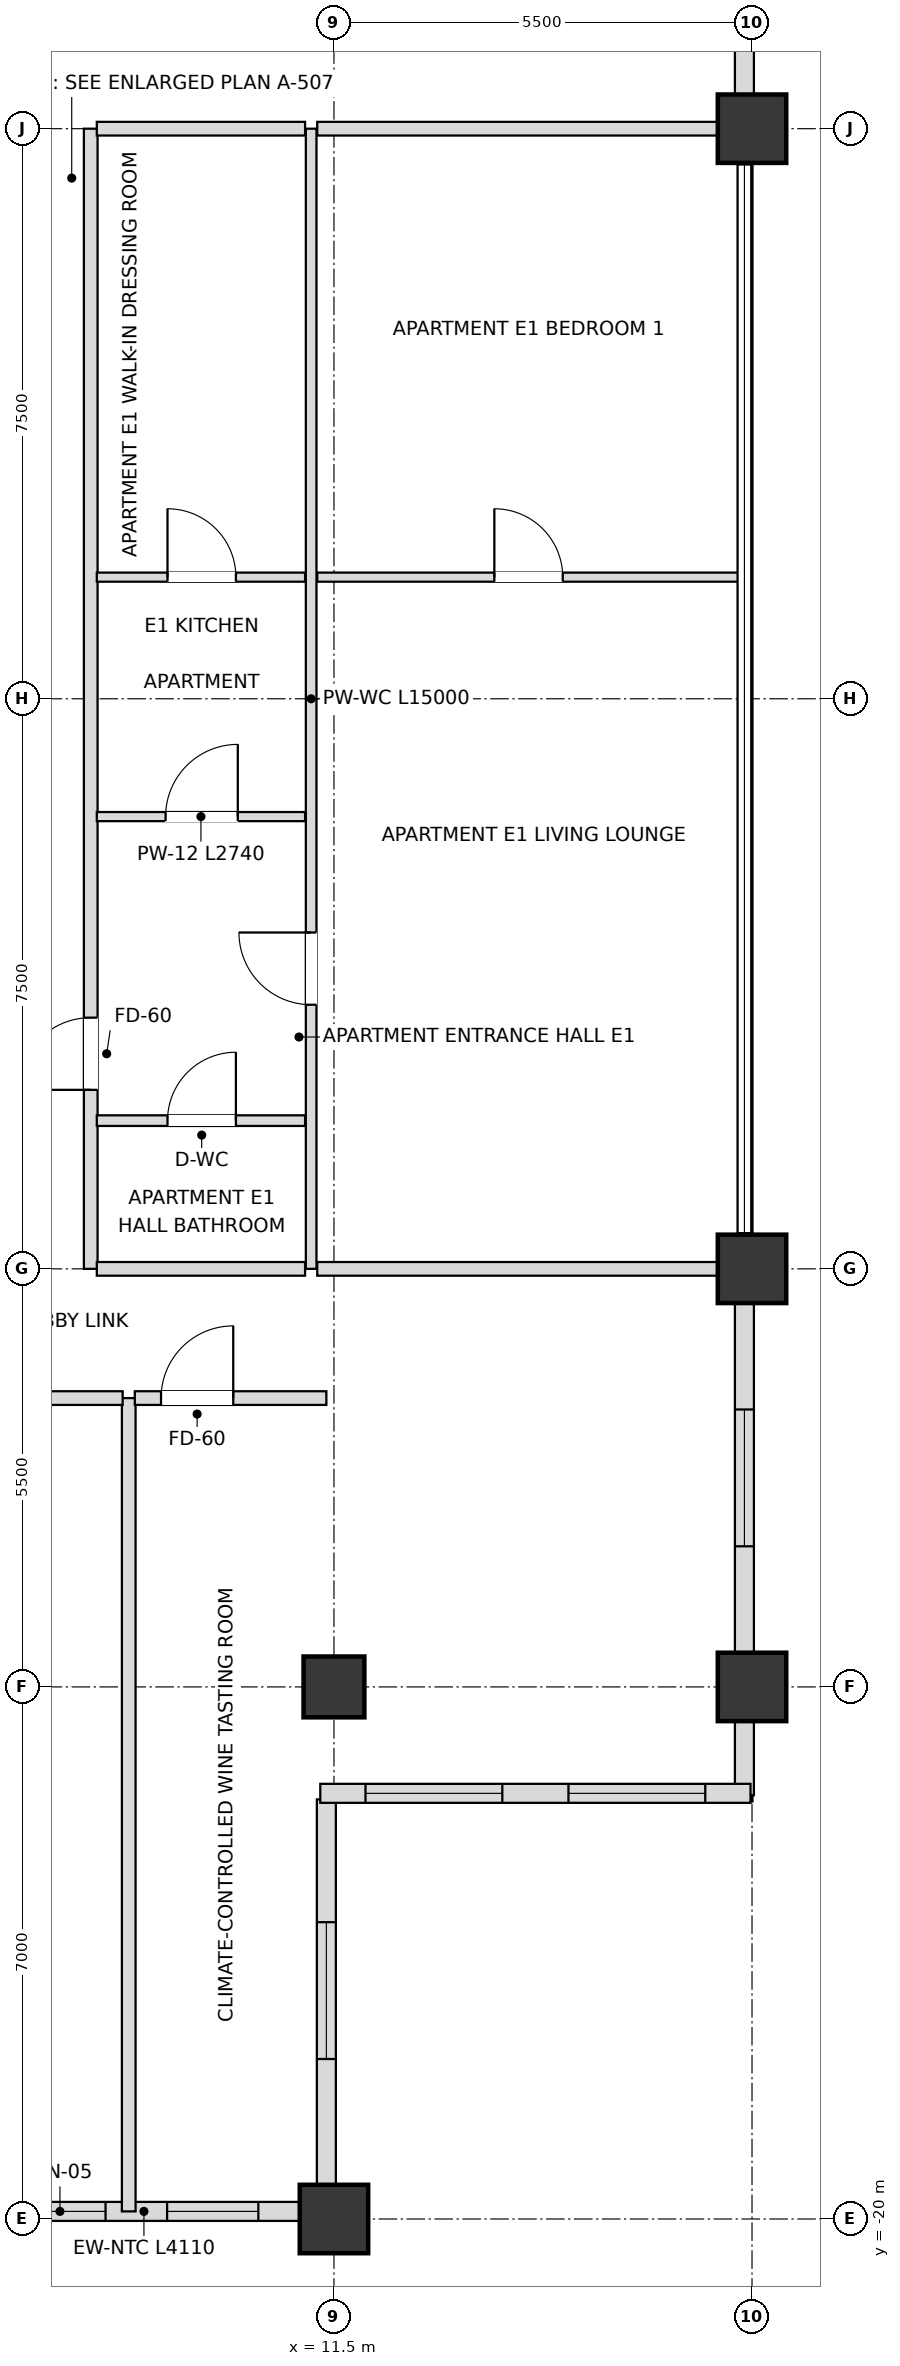
"""IFC4 building model, lengths in metres.
Left out: names, types, materials, properties, quantities, classifications, styles, units other than length and angle.
Written with IfcOpenShell. Run it as: python <this file> out.ifc"""

import sys

from ifc_helpers import new_model, si_unit, direction, frame, frame_2d, origin, origin_2d, place, context, subcontext, project, spatial, rectangle, extrude, element, fill, save


model = new_model("IFC4")
c1 = context("Model", 3, precision=1e-05, world=origin(), true_north=direction((0.0, 1.0)))
c2 = subcontext(c1, "Body", "Model", "MODEL_VIEW")
j1 = project(units=[si_unit("LENGTHUNIT", "METRE"), si_unit("PLANEANGLEUNIT", "RADIAN")], contexts=[c1])
p1 = place(None, origin())
s1 = spatial("IfcSite", under=j1, at=p1, CompositionType="ELEMENT")
p2 = place(p1, origin())
s2 = spatial("IfcBuilding", under=s1, at=p2, CompositionType="ELEMENT")
p3 = place(p2, frame((0.0, 0.0, 290.7)))
s3 = spatial("IfcBuildingStorey", under=s2, at=p3, CompositionType="ELEMENT", Elevation=290.7)
for number, where, z_axis, x_axis in (
    (1, (11.5, -20.0, 0.0), (0.0, 0.0, 1.0), (1.0, 0.0, 0.0)),
    (2, (17.0, -13.0, 0.0), (0.0, 0.0, 1.0), (1.0, 0.0, 0.0)),
    (3, (17.0, -7.5, 0.0), (0.0, 0.0, 1.0), (1.0, 0.0, 0.0)),
    (4, (17.0, 7.5, 0.0), (0.0, 0.0, 1.0), (1.0, 0.0, 0.0)),
):
    element("IfcColumn", number, at=place(p3, frame(where, z_axis=z_axis, x_axis=x_axis)), inside=s3, PredefinedType="USERDEFINED", context=c2, shape_type="SweptSolid", body=[
        extrude(rectangle(XDim=0.9, YDim=0.9, at=origin_2d()), origin(), (0.0, 0.0, 1.0), 3.6),
    ])
p4 = place(p3, frame((11.5, -13.0, 0.0), z_axis=(0.0, 0.0, 1.0), x_axis=(1.0, 0.0, 0.0)))
e5 = element("IfcColumn", 5, at=p4, inside=s3, PredefinedType="COLUMN", context=c2, shape_type="SweptSolid", body=[
    extrude(rectangle(XDim=0.8, YDim=0.8, at=origin_2d()), origin(), (0.0, 0.0, 1.0), 3.6),
])
p5 = place(p3, frame((6.945, -19.9, 0.0), z_axis=(0.0, 0.0, 1.0), x_axis=(1.0, 0.0, 0.0)))
e6 = element("IfcWall", 6, at=p5, inside=s3, PredefinedType="SOLIDWALL", context=c2, shape_type="SweptSolid", body=[
    extrude(rectangle(XDim=4.11, YDim=0.25, at=frame_2d((2.055, 0.0))), origin(), (0.0, 0.0, 1.0), 2.748),
])
p6 = place(p5, frame((0.35, 0.0, 0.72)))
e7 = element("IfcOpeningElement", 7, at=p6, cuts=e6, PredefinedType="OPENING", context=c2, shape_type="SweptSolid", body=[
    extrude(rectangle(XDim=1.2, YDim=1.68, at=frame_2d((0.6, 0.84))), frame((0.0, 0.135, 0.0), z_axis=(0.0, -1.0, 0.0), x_axis=(1.0, 0.0, 0.0)), (0.0, 0.0, 1.0), 0.27),
])
p7 = place(p5, frame((2.36, 0.0, 0.72)))
e8 = element("IfcOpeningElement", 8, at=p7, cuts=e6, PredefinedType="OPENING", context=c2, shape_type="SweptSolid", body=[
    extrude(rectangle(XDim=1.2, YDim=1.68, at=frame_2d((0.6, 0.84))), frame((0.0, 0.135, 0.0), z_axis=(0.0, -1.0, 0.0), x_axis=(1.0, 0.0, 0.0)), (0.0, 0.0, 1.0), 0.27),
])
p8 = place(p3, frame((16.9, -14.425, 0.0), z_axis=(0.0, 0.0, 1.0), x_axis=(0.0, 1.0, 0.0)))
e9 = element("IfcWall", 9, at=p8, inside=s3, PredefinedType="SOLIDWALL", context=c2, shape_type="SweptSolid", body=[
    extrude(rectangle(XDim=0.98, YDim=0.25, at=frame_2d((0.49, 0.0))), origin(), (0.0, 0.0, 1.0), 2.748),
])
p9 = place(p3, frame((16.9, -12.555, 0.0), z_axis=(0.0, 0.0, 1.0), x_axis=(0.0, 1.0, 0.0)))
e10 = element("IfcWall", 10, at=p9, inside=s3, PredefinedType="SOLIDWALL", context=c2, shape_type="SweptSolid", body=[
    extrude(rectangle(XDim=4.61, YDim=0.25, at=frame_2d((2.305, 0.0))), origin(), (0.0, 0.0, 1.0), 2.748),
])
p10 = place(p9, frame((1.405, 0.0, 0.72)))
e11 = element("IfcOpeningElement", 11, at=p10, cuts=e10, PredefinedType="OPENING", context=c2, shape_type="SweptSolid", body=[
    extrude(rectangle(XDim=1.8, YDim=1.68, at=frame_2d((0.9, 0.84))), frame((0.0, 0.135, 0.0), z_axis=(0.0, -1.0, 0.0), x_axis=(1.0, 0.0, 0.0)), (0.0, 0.0, 1.0), 0.27),
])
p11 = place(p3, frame((16.9, 7.945, 0.0), z_axis=(0.0, 0.0, 1.0), x_axis=(0.0, 1.0, 0.0)))
e12 = element("IfcWall", 12, at=p11, inside=s3, PredefinedType="SOLIDWALL", context=c2, shape_type="SweptSolid", body=[
    extrude(rectangle(XDim=4.61, YDim=0.25, at=frame_2d((2.305, 0.0))), origin(), (0.0, 0.0, 1.0), 2.748),
])
p12 = place(p11, frame((1.405, 0.0, 0.72)))
e13 = element("IfcOpeningElement", 13, at=p12, cuts=e12, PredefinedType="OPENING", context=c2, shape_type="SweptSolid", body=[
    extrude(rectangle(XDim=1.8, YDim=1.68, at=frame_2d((0.9, 0.84))), frame((0.0, 0.135, 0.0), z_axis=(0.0, -1.0, 0.0), x_axis=(1.0, 0.0, 0.0)), (0.0, 0.0, 1.0), 0.27),
])
p13 = place(p3, frame((11.4, -19.82, 0.0), z_axis=(0.0, 0.0, 1.0), x_axis=(0.0, 1.0, 0.0)))
e14 = element("IfcWall", 14, at=p13, inside=s3, PredefinedType="SOLIDWALL", context=c2, shape_type="SweptSolid", body=[
    extrude(rectangle(XDim=5.34, YDim=0.25, at=frame_2d((2.67, 0.0))), origin(), (0.0, 0.0, 1.0), 2.748),
])
p14 = place(p13, frame((1.925, 0.0, 0.72)))
e15 = element("IfcOpeningElement", 15, at=p14, cuts=e14, PredefinedType="OPENING", context=c2, shape_type="SweptSolid", body=[
    extrude(rectangle(XDim=1.8, YDim=1.68, at=frame_2d((0.9, 0.84))), frame((0.0, 0.135, 0.0), z_axis=(0.0, -1.0, 0.0), x_axis=(1.0, 0.0, 0.0)), (0.0, 0.0, 1.0), 0.27),
])
p15 = place(p3, frame((11.32, -14.4, 0.0), z_axis=(0.0, 0.0, 1.0), x_axis=(1.0, 0.0, 0.0)))
e16 = element("IfcWall", 16, at=p15, inside=s3, PredefinedType="SOLIDWALL", context=c2, shape_type="SweptSolid", body=[
    extrude(rectangle(XDim=5.66, YDim=0.25, at=frame_2d((2.83, 0.0))), origin(), (0.0, 0.0, 1.0), 2.748),
])
p16 = place(p15, frame((0.595, 0.0, 0.72)))
e17 = element("IfcOpeningElement", 17, at=p16, cuts=e16, PredefinedType="OPENING", context=c2, shape_type="SweptSolid", body=[
    extrude(rectangle(XDim=1.8, YDim=1.68, at=frame_2d((0.9, 0.84))), frame((0.0, 0.135, 0.0), z_axis=(0.0, -1.0, 0.0), x_axis=(1.0, 0.0, 0.0)), (0.0, 0.0, 1.0), 0.27),
])
p17 = place(p15, frame((3.265, 0.0, 0.72)))
e18 = element("IfcOpeningElement", 18, at=p17, cuts=e16, PredefinedType="OPENING", context=c2, shape_type="SweptSolid", body=[
    extrude(rectangle(XDim=1.8, YDim=1.68, at=frame_2d((0.9, 0.84))), frame((0.0, 0.135, 0.0), z_axis=(0.0, -1.0, 0.0), x_axis=(1.0, 0.0, 0.0)), (0.0, 0.0, 1.0), 0.27),
])
p18 = place(p3, frame((8.3, -7.5, 0.0), z_axis=(0.0, 0.0, 1.0), x_axis=(0.0, 1.0, 0.0)))
e19 = element("IfcWall", 19, at=p18, inside=s3, PredefinedType="PARTITIONING", context=c2, shape_type="SweptSolid", body=[
    extrude(rectangle(XDim=15.0, YDim=0.18, at=frame_2d((7.5, 0.0))), origin(), (0.0, 0.0, 1.0), 3.38),
])
p19 = place(p18, frame((2.355, 0.0, 0.0)))
e20 = element("IfcOpeningElement", 20, at=p19, cuts=e19, PredefinedType="OPENING", context=c2, shape_type="SweptSolid", body=[
    extrude(rectangle(XDim=0.95, YDim=2.15, at=frame_2d((0.475, 1.075))), frame((0.0, 0.1, 0.0), z_axis=(0.0, -1.0, 0.0), x_axis=(1.0, 0.0, 0.0)), (0.0, 0.0, 1.0), 0.2),
])
p20 = place(p3, frame((8.8, -19.9, 0.0), z_axis=(0.0, 0.0, 1.0), x_axis=(0.0, 1.0, 0.0)))
e21 = element("IfcWall", 21, at=p20, inside=s3, PredefinedType="PARTITIONING", context=c2, shape_type="SweptSolid", body=[
    extrude(rectangle(XDim=10.7, YDim=0.18, at=frame_2d((5.35, 0.0))), origin(), (0.0, 0.0, 1.0), 2.826),
])
p21 = place(p3, frame((11.2, -7.5, 0.0), z_axis=(0.0, 0.0, 1.0), x_axis=(0.0, 1.0, 0.0)))
e22 = element("IfcWall", 22, at=p21, inside=s3, PredefinedType="PARTITIONING", context=c2, shape_type="SweptSolid", body=[
    extrude(rectangle(XDim=15.0, YDim=0.14, at=frame_2d((7.5, 0.0))), origin(), (0.0, 0.0, 1.0), 3.38),
])
p22 = place(p21, frame((3.475, 0.0, 0.0)))
e23 = element("IfcOpeningElement", 23, at=p22, cuts=e22, PredefinedType="OPENING", context=c2, shape_type="SweptSolid", body=[
    extrude(rectangle(XDim=0.95, YDim=2.1, at=frame_2d((0.475, 1.05))), frame((0.0, 0.08, 0.0), z_axis=(0.0, -1.0, 0.0), x_axis=(1.0, 0.0, 0.0)), (0.0, 0.0, 1.0), 0.16),
])
p23 = place(p3, frame((-1.07, -9.2, 0.0), z_axis=(0.0, 0.0, 1.0), x_axis=(1.0, 0.0, 0.0)))
e24 = element("IfcWall", 24, at=p23, inside=s3, PredefinedType="PARTITIONING", context=c2, shape_type="SweptSolid", body=[
    extrude(rectangle(XDim=9.79, YDim=0.18, at=frame_2d((4.895, 0.0))), origin(), (0.0, 0.0, 1.0), 2.826),
])
p24 = place(p23, frame((4.435, 0.0, 0.0)))
e25 = element("IfcOpeningElement", 25, at=p24, cuts=e24, PredefinedType="OPENING", context=c2, shape_type="SweptSolid", body=[
    extrude(rectangle(XDim=0.95, YDim=2.15, at=frame_2d((0.475, 1.075))), frame((0.0, 0.1, 0.0), z_axis=(0.0, -1.0, 0.0), x_axis=(1.0, 0.0, 0.0)), (0.0, 0.0, 1.0), 0.2),
])
p25 = place(p3, frame((8.88, -9.2, 0.0), z_axis=(0.0, 0.0, 1.0), x_axis=(1.0, 0.0, 0.0)))
e26 = element("IfcWall", 26, at=p25, inside=s3, PredefinedType="PARTITIONING", context=c2, shape_type="SweptSolid", body=[
    extrude(rectangle(XDim=2.52, YDim=0.18, at=frame_2d((1.26, 0.0))), origin(), (0.0, 0.0, 1.0), 3.38),
])
p26 = place(p25, frame((0.345, 0.0, 0.0)))
e27 = element("IfcOpeningElement", 27, at=p26, cuts=e26, PredefinedType="OPENING", context=c2, shape_type="SweptSolid", body=[
    extrude(rectangle(XDim=0.95, YDim=2.15, at=frame_2d((0.475, 1.075))), frame((0.0, 0.1, 0.0), z_axis=(0.0, -1.0, 0.0), x_axis=(1.0, 0.0, 0.0)), (0.0, 0.0, 1.0), 0.2),
])
p27 = place(p3, frame((8.38, -7.5, 0.0), z_axis=(0.0, 0.0, 1.0), x_axis=(1.0, 0.0, 0.0)))
e28 = element("IfcWall", 28, at=p27, inside=s3, PredefinedType="PARTITIONING", context=c2, shape_type="SweptSolid", body=[
    extrude(rectangle(XDim=2.74, YDim=0.18, at=frame_2d((1.37, 0.0))), origin(), (0.0, 0.0, 1.0), 2.826),
])
p28 = place(p3, frame((11.28, -7.5, 0.0), z_axis=(0.0, 0.0, 1.0), x_axis=(1.0, 0.0, 0.0)))
e29 = element("IfcWall", 29, at=p28, inside=s3, PredefinedType="PARTITIONING", context=c2, shape_type="SweptSolid", body=[
    extrude(rectangle(XDim=5.62, YDim=0.18, at=frame_2d((2.81, 0.0))), origin(), (0.0, 0.0, 1.0), 2.826),
])
p29 = place(p3, frame((8.38, -5.55, 0.0), z_axis=(0.0, 0.0, 1.0), x_axis=(1.0, 0.0, 0.0)))
e30 = element("IfcWall", 30, at=p29, inside=s3, PredefinedType="PARTITIONING", context=c2, shape_type="SweptSolid", body=[
    extrude(rectangle(XDim=2.74, YDim=0.14, at=frame_2d((1.37, 0.0))), origin(), (0.0, 0.0, 1.0), 3.38),
])
p30 = place(p29, frame((0.93, 0.0, 0.0)))
e31 = element("IfcOpeningElement", 31, at=p30, cuts=e30, PredefinedType="OPENING", context=c2, shape_type="SweptSolid", body=[
    extrude(rectangle(XDim=0.9, YDim=2.1, at=frame_2d((0.45, 1.05))), frame((0.0, 0.08, 0.0), z_axis=(0.0, -1.0, 0.0), x_axis=(1.0, 0.0, 0.0)), (0.0, 0.0, 1.0), 0.16),
])
p31 = place(p3, frame((8.38, -1.55, 0.0), z_axis=(0.0, 0.0, 1.0), x_axis=(1.0, 0.0, 0.0)))
e32 = element("IfcWall", 32, at=p31, inside=s3, PredefinedType="PARTITIONING", context=c2, shape_type="SweptSolid", body=[
    extrude(rectangle(XDim=2.74, YDim=0.12, at=frame_2d((1.37, 0.0))), origin(), (0.0, 0.0, 1.0), 3.38),
])
p32 = place(p31, frame((0.905, 0.0, 0.0)))
e33 = element("IfcOpeningElement", 33, at=p32, cuts=e32, PredefinedType="OPENING", context=c2, shape_type="SweptSolid", body=[
    extrude(rectangle(XDim=0.95, YDim=2.1, at=frame_2d((0.475, 1.05))), frame((0.0, 0.07, 0.0), z_axis=(0.0, -1.0, 0.0), x_axis=(1.0, 0.0, 0.0)), (0.0, 0.0, 1.0), 0.14),
])
p33 = place(p3, frame((8.38, 1.6, 0.0), z_axis=(0.0, 0.0, 1.0), x_axis=(1.0, 0.0, 0.0)))
e34 = element("IfcWall", 34, at=p33, inside=s3, PredefinedType="PARTITIONING", context=c2, shape_type="SweptSolid", body=[
    extrude(rectangle(XDim=2.74, YDim=0.12, at=frame_2d((1.37, 0.0))), origin(), (0.0, 0.0, 1.0), 3.38),
])
p34 = place(p33, frame((0.93, 0.0, 0.0)))
e35 = element("IfcOpeningElement", 35, at=p34, cuts=e34, PredefinedType="OPENING", context=c2, shape_type="SweptSolid", body=[
    extrude(rectangle(XDim=0.9, YDim=2.1, at=frame_2d((0.45, 1.05))), frame((0.0, 0.07, 0.0), z_axis=(0.0, -1.0, 0.0), x_axis=(1.0, 0.0, 0.0)), (0.0, 0.0, 1.0), 0.14),
])
p35 = place(p3, frame((11.28, 1.6, 0.0), z_axis=(0.0, 0.0, 1.0), x_axis=(1.0, 0.0, 0.0)))
e36 = element("IfcWall", 36, at=p35, inside=s3, PredefinedType="PARTITIONING", context=c2, shape_type="SweptSolid", body=[
    extrude(rectangle(XDim=5.54, YDim=0.12, at=frame_2d((2.77, 0.0))), origin(), (0.0, 0.0, 1.0), 3.018),
])
p36 = place(p35, frame((2.33, 0.0, 0.0)))
e37 = element("IfcOpeningElement", 37, at=p36, cuts=e36, PredefinedType="OPENING", context=c2, shape_type="SweptSolid", body=[
    extrude(rectangle(XDim=0.9, YDim=2.1, at=frame_2d((0.45, 1.05))), frame((0.0, 0.07, 0.0), z_axis=(0.0, -1.0, 0.0), x_axis=(1.0, 0.0, 0.0)), (0.0, 0.0, 1.0), 0.14),
])
p37 = place(p3, frame((8.38, 7.5, 0.0), z_axis=(0.0, 0.0, 1.0), x_axis=(1.0, 0.0, 0.0)))
e38 = element("IfcWall", 38, at=p37, inside=s3, PredefinedType="PARTITIONING", context=c2, shape_type="SweptSolid", body=[
    extrude(rectangle(XDim=2.74, YDim=0.18, at=frame_2d((1.37, 0.0))), origin(), (0.0, 0.0, 1.0), 2.826),
])
p38 = place(p3, frame((11.28, 7.5, 0.0), z_axis=(0.0, 0.0, 1.0), x_axis=(1.0, 0.0, 0.0)))
e39 = element("IfcWall", 39, at=p38, inside=s3, PredefinedType="PARTITIONING", context=c2, shape_type="SweptSolid", body=[
    extrude(rectangle(XDim=5.62, YDim=0.18, at=frame_2d((2.81, 0.0))), origin(), (0.0, 0.0, 1.0), 2.826),
])
p39 = place(p6, origin())
e40 = element("IfcWindow", 40, at=p39, inside=s3, PartitioningType="SINGLE_PANEL", PredefinedType="WINDOW", context=c2, shape_type="SweptSolid", body=[
    extrude(rectangle(XDim=1.2, YDim=1.68, at=frame_2d((0.6, 0.84))), frame((0.0, 0.03, 0.0), z_axis=(0.0, -1.0, 0.0), x_axis=(1.0, 0.0, 0.0)), (0.0, 0.0, 1.0), 0.06),
])
fill(e7, e40)
p40 = place(p7, origin())
e41 = element("IfcWindow", 41, at=p40, inside=s3, PartitioningType="SINGLE_PANEL", PredefinedType="WINDOW", context=c2, shape_type="SweptSolid", body=[
    extrude(rectangle(XDim=1.2, YDim=1.68, at=frame_2d((0.6, 0.84))), frame((0.0, 0.03, 0.0), z_axis=(0.0, -1.0, 0.0), x_axis=(1.0, 0.0, 0.0)), (0.0, 0.0, 1.0), 0.06),
])
fill(e8, e41)
p41 = place(p10, origin())
e42 = element("IfcWindow", 42, at=p41, inside=s3, PartitioningType="SINGLE_PANEL", PredefinedType="WINDOW", context=c2, shape_type="SweptSolid", body=[
    extrude(rectangle(XDim=1.8, YDim=1.68, at=frame_2d((0.9, 0.84))), frame((0.0, 0.03, 0.0), z_axis=(0.0, -1.0, 0.0), x_axis=(1.0, 0.0, 0.0)), (0.0, 0.0, 1.0), 0.06),
])
fill(e11, e42)
p42 = place(p14, origin())
e43 = element("IfcWindow", 43, at=p42, inside=s3, PartitioningType="SINGLE_PANEL", PredefinedType="WINDOW", context=c2, shape_type="SweptSolid", body=[
    extrude(rectangle(XDim=1.8, YDim=1.68, at=frame_2d((0.9, 0.84))), frame((0.0, 0.03, 0.0), z_axis=(0.0, -1.0, 0.0), x_axis=(1.0, 0.0, 0.0)), (0.0, 0.0, 1.0), 0.06),
])
fill(e15, e43)
p43 = place(p16, origin())
e44 = element("IfcWindow", 44, at=p43, inside=s3, PartitioningType="SINGLE_PANEL", PredefinedType="WINDOW", context=c2, shape_type="SweptSolid", body=[
    extrude(rectangle(XDim=1.8, YDim=1.68, at=frame_2d((0.9, 0.84))), frame((0.0, 0.03, 0.0), z_axis=(0.0, -1.0, 0.0), x_axis=(1.0, 0.0, 0.0)), (0.0, 0.0, 1.0), 0.06),
])
fill(e17, e44)
p44 = place(p17, origin())
e45 = element("IfcWindow", 45, at=p44, inside=s3, PartitioningType="SINGLE_PANEL", PredefinedType="WINDOW", context=c2, shape_type="SweptSolid", body=[
    extrude(rectangle(XDim=1.8, YDim=1.68, at=frame_2d((0.9, 0.84))), frame((0.0, 0.03, 0.0), z_axis=(0.0, -1.0, 0.0), x_axis=(1.0, 0.0, 0.0)), (0.0, 0.0, 1.0), 0.06),
])
fill(e18, e45)
p45 = place(p26, origin())
e46 = element("IfcDoor", 46, at=p45, inside=s3, OperationType="SINGLE_SWING_RIGHT", PredefinedType="DOOR", context=c2, shape_type="SweptSolid", body=[
    extrude(rectangle(XDim=0.95, YDim=2.15, at=frame_2d((0.475, 1.075))), frame((0.0, 0.025, 0.0), z_axis=(0.0, -1.0, 0.0), x_axis=(1.0, 0.0, 0.0)), (0.0, 0.0, 1.0), 0.05),
])
fill(e27, e46)
p46 = place(p30, origin())
e47 = element("IfcDoor", 47, at=p46, inside=s3, OperationType="SINGLE_SWING_RIGHT", PredefinedType="DOOR", context=c2, shape_type="SweptSolid", body=[
    extrude(rectangle(XDim=0.9, YDim=2.1, at=frame_2d((0.45, 1.05))), frame((0.0, 0.025, 0.0), z_axis=(0.0, -1.0, 0.0), x_axis=(1.0, 0.0, 0.0)), (0.0, 0.0, 1.0), 0.05),
])
fill(e31, e47)
p47 = place(p19, origin())
e48 = element("IfcDoor", 48, at=p47, inside=s3, OperationType="SINGLE_SWING_LEFT", PredefinedType="DOOR", context=c2, shape_type="SweptSolid", body=[
    extrude(rectangle(XDim=0.95, YDim=2.15, at=frame_2d((0.475, 1.075))), frame((0.0, 0.025, 0.0), z_axis=(0.0, -1.0, 0.0), x_axis=(1.0, 0.0, 0.0)), (0.0, 0.0, 1.0), 0.05),
])
fill(e20, e48)
p48 = place(p32, origin())
e49 = element("IfcDoor", 49, at=p48, inside=s3, OperationType="SINGLE_SWING_RIGHT", PredefinedType="DOOR", context=c2, shape_type="SweptSolid", body=[
    extrude(rectangle(XDim=0.95, YDim=2.1, at=frame_2d((0.475, 1.05))), frame((0.0, 0.025, 0.0), z_axis=(0.0, -1.0, 0.0), x_axis=(1.0, 0.0, 0.0)), (0.0, 0.0, 1.0), 0.05),
])
fill(e33, e49)
p49 = place(p34, origin())
e50 = element("IfcDoor", 50, at=p49, inside=s3, OperationType="SINGLE_SWING_LEFT", PredefinedType="DOOR", context=c2, shape_type="SweptSolid", body=[
    extrude(rectangle(XDim=0.9, YDim=2.1, at=frame_2d((0.45, 1.05))), frame((0.0, 0.025, 0.0), z_axis=(0.0, -1.0, 0.0), x_axis=(1.0, 0.0, 0.0)), (0.0, 0.0, 1.0), 0.05),
])
fill(e35, e50)
p50 = place(p22, origin())
e51 = element("IfcDoor", 51, at=p50, inside=s3, OperationType="SINGLE_SWING_RIGHT", PredefinedType="DOOR", context=c2, shape_type="SweptSolid", body=[
    extrude(rectangle(XDim=0.95, YDim=2.1, at=frame_2d((0.475, 1.05))), frame((0.0, 0.025, 0.0), z_axis=(0.0, -1.0, 0.0), x_axis=(1.0, 0.0, 0.0)), (0.0, 0.0, 1.0), 0.05),
])
fill(e23, e51)
p51 = place(p36, origin())
e52 = element("IfcDoor", 52, at=p51, inside=s3, OperationType="SINGLE_SWING_LEFT", PredefinedType="DOOR", context=c2, shape_type="SweptSolid", body=[
    extrude(rectangle(XDim=0.9, YDim=2.1, at=frame_2d((0.45, 1.05))), frame((0.0, 0.025, 0.0), z_axis=(0.0, -1.0, 0.0), x_axis=(1.0, 0.0, 0.0)), (0.0, 0.0, 1.0), 0.05),
])
fill(e37, e52)
save(model, sys.argv[1])
